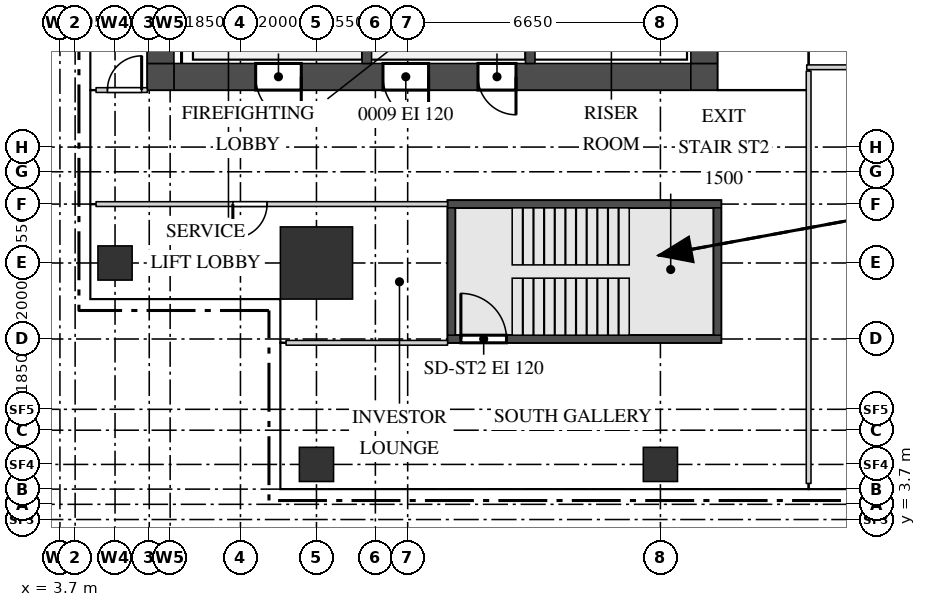
"""IFC4 building model, lengths in metres.
Left out: names, types, materials, properties, quantities, classifications, styles, units other than length and angle.
Written with IfcOpenShell. Run it as: python <this file> out.ifc"""

import sys

from ifc_helpers import new_model, si_unit, direction, frame, frame_2d, origin, origin_2d, place, context, subcontext, project, spatial, rectangle, extrude, source, transform, mapped, element, fill, save


model = new_model("IFC4")
c1 = context("Model", 3, precision=1e-05, world=origin(), true_north=direction((0.0, 1.0)))
c2 = subcontext(c1, "Body", "Model", "MODEL_VIEW")
j1 = project(units=[si_unit("LENGTHUNIT", "METRE"), si_unit("PLANEANGLEUNIT", "RADIAN")], contexts=[c1])
p1 = place(None, origin())
s1 = spatial("IfcSite", under=j1, at=p1, CompositionType="ELEMENT")
p2 = place(p1, origin())
s2 = spatial("IfcBuilding", under=s1, at=p2, CompositionType="ELEMENT")
p3 = place(p2, frame((0.0, 0.0, 234.2)))
s3 = spatial("IfcBuildingStorey", under=s2, at=p3, CompositionType="ELEMENT", Elevation=234.2)
m1 = source(origin(), c2, "Body", "SweptSolid", [
    extrude(rectangle(XDim=13.6, YDim=0.7, at=frame_2d((6.8, 0.0))), origin(), (0.0, 0.0, 1.0), 3.75),
])
p4 = place(p3, frame((6.7, 15.35, 0.0), z_axis=(0.0, 0.0, 1.0), x_axis=(1.0, 0.0, 0.0)))
e1 = element("IfcWall", 1, at=p4, inside=s3, PredefinedType="SHEAR", context=c2, shape_type="MappedRepresentation", body=[
    mapped(m1, transform((0.0, 0.0, 0.0))),
])
m2 = source(origin(), c2, "Body", "SweptSolid", [
    extrude(rectangle(XDim=1.2, YDim=2.1, at=frame_2d((0.6, 1.05))), frame((0.0, 0.36, 0.0), z_axis=(0.0, -1.0, 0.0), x_axis=(1.0, 0.0, 0.0)), (0.0, 0.0, 1.0), 0.72),
])
p5 = place(p4, frame((5.5, 0.0, 0.0)))
e2 = element("IfcOpeningElement", 2, at=p5, cuts=e1, PredefinedType="OPENING", context=c2, shape_type="MappedRepresentation", body=[
    mapped(m2, transform((0.0, 0.0, 0.0))),
])
p6 = place(p4, frame((2.15, 0.0, 0.0)))
e3 = element("IfcOpeningElement", 3, at=p6, cuts=e1, PredefinedType="OPENING", context=c2, shape_type="MappedRepresentation", body=[
    mapped(m2, transform((0.0, 0.0, 0.0))),
])
m3 = source(origin(), c2, "Body", "SweptSolid", [
    extrude(rectangle(XDim=1.0, YDim=2.1, at=frame_2d((0.5, 1.05))), frame((0.0, 0.36, 0.0), z_axis=(0.0, -1.0, 0.0), x_axis=(1.0, 0.0, 0.0)), (0.0, 0.0, 1.0), 0.72),
])
p7 = place(p4, frame((8.0, 0.0, 0.0)))
e4 = element("IfcOpeningElement", 4, at=p7, cuts=e1, PredefinedType="OPENING", context=c2, shape_type="MappedRepresentation", body=[
    mapped(m3, transform((0.0, 0.0, 0.0))),
])
m4 = source(origin(), c2, "Body", "SweptSolid", [
    extrude(rectangle(XDim=0.7, YDim=0.7, at=frame_2d((0.35, 0.0))), origin(), (0.0, 0.0, 1.0), 3.75),
])
for number, where, z_axis, x_axis in (
    (5, (20.3, 15.35, 0.0), (0.0, 0.0, 1.0), (1.0, 0.0, 0.0)),
    (6, (6.0, 15.35, 0.0), (0.0, 0.0, 1.0), (1.0, 0.0, 0.0)),
):
    element("IfcWall", number, at=place(p3, frame(where, z_axis=z_axis, x_axis=x_axis)), inside=s3, PredefinedType="SHEAR", context=c2, shape_type="MappedRepresentation", body=[
        mapped(m4, transform((0.0, 0.0, 0.0))),
    ])
m5 = source(origin(), c2, "Body", "SweptSolid", [
    extrude(rectangle(XDim=22.6, YDim=0.7, at=frame_2d((11.3, 0.0))), origin(), (0.0, 0.0, 1.0), 3.75),
])
p8 = place(p3, frame((20.65, 15.7, 0.0), z_axis=(0.0, 0.0, 1.0), x_axis=(0.0, 1.0, 0.0)))
e7 = element("IfcWall", 7, at=p8, inside=s3, PredefinedType="SHEAR", context=c2, shape_type="MappedRepresentation", body=[
    mapped(m5, transform((0.0, 0.0, 0.0))),
])
m6 = source(origin(), c2, "Body", "SweptSolid", [
    extrude(rectangle(XDim=1.8, YDim=2.1, at=frame_2d((0.9, 1.05))), frame((0.0, 0.36, 0.0), z_axis=(0.0, -1.0, 0.0), x_axis=(1.0, 0.0, 0.0)), (0.0, 0.0, 1.0), 0.72),
])
p9 = place(p8, frame((10.8, 0.0, 0.0)))
e8 = element("IfcOpeningElement", 8, at=p9, cuts=e7, PredefinedType="OPENING", context=c2, shape_type="MappedRepresentation", body=[
    mapped(m6, transform((0.0, 0.0, 0.0))),
])
m7 = source(origin(), c2, "Body", "SweptSolid", [
    extrude(rectangle(XDim=0.9, YDim=2.1, at=frame_2d((0.45, 1.05))), frame((0.0, 0.36, 0.0), z_axis=(0.0, -1.0, 0.0), x_axis=(1.0, 0.0, 0.0)), (0.0, 0.0, 1.0), 0.72),
])
p10 = place(p8, frame((0.45, 0.0, 0.0)))
e9 = element("IfcOpeningElement", 9, at=p10, cuts=e7, PredefinedType="OPENING", context=c2, shape_type="MappedRepresentation", body=[
    mapped(m7, transform((0.0, 0.0, 0.0))),
])
p11 = place(p8, frame((2.2, 0.0, 0.0)))
e10 = element("IfcOpeningElement", 10, at=p11, cuts=e7, PredefinedType="OPENING", context=c2, shape_type="MappedRepresentation", body=[
    mapped(m3, transform((0.0, 0.0, 0.0))),
])
p12 = place(p8, frame((5.0, 0.0, 0.0)))
e11 = element("IfcOpeningElement", 11, at=p12, cuts=e7, PredefinedType="OPENING", context=c2, shape_type="MappedRepresentation", body=[
    mapped(m7, transform((0.0, 0.0, 0.0))),
])
p13 = place(p3, frame((6.35, 15.7, 0.0), z_axis=(0.0, 0.0, 1.0), x_axis=(0.0, 1.0, 0.0)))
e12 = element("IfcWall", 12, at=p13, inside=s3, PredefinedType="SHEAR", context=c2, shape_type="MappedRepresentation", body=[
    mapped(m5, transform((0.0, 0.0, 0.0))),
])
m8 = source(origin(), c2, "Body", "SweptSolid", [
    extrude(rectangle(XDim=7.2, YDim=0.2, at=frame_2d((3.6, 0.0))), origin(), (0.0, 0.0, 1.0), 3.75),
])
p14 = place(p3, frame((13.9, 12.0, 0.0), z_axis=(0.0, 0.0, 1.0), x_axis=(1.0, 0.0, 0.0)))
e13 = element("IfcWall", 13, at=p14, inside=s3, PredefinedType="SHEAR", context=c2, shape_type="MappedRepresentation", body=[
    mapped(m8, transform((0.0, 0.0, 0.0))),
])
p15 = place(p3, frame((13.9, 8.45, 0.0), z_axis=(0.0, 0.0, 1.0), x_axis=(1.0, 0.0, 0.0)))
e14 = element("IfcWall", 14, at=p15, inside=s3, PredefinedType="SHEAR", context=c2, shape_type="MappedRepresentation", body=[
    mapped(m8, transform((0.0, 0.0, 0.0))),
])
m9 = source(origin(), c2, "Body", "SweptSolid", [
    extrude(rectangle(XDim=1.2, YDim=2.1, at=frame_2d((0.6, 1.05))), frame((0.0, 0.11, 0.0), z_axis=(0.0, -1.0, 0.0), x_axis=(1.0, 0.0, 0.0)), (0.0, 0.0, 1.0), 0.22),
])
p16 = place(p15, frame((0.35, 0.0, 0.0)))
e15 = element("IfcOpeningElement", 15, at=p16, cuts=e14, PredefinedType="OPENING", context=c2, shape_type="MappedRepresentation", body=[
    mapped(m9, transform((0.0, 0.0, 0.0))),
])
m10 = source(origin(), c2, "Body", "SweptSolid", [
    extrude(rectangle(XDim=3.35, YDim=0.2, at=frame_2d((1.675, 0.0))), origin(), (0.0, 0.0, 1.0), 3.75),
])
for number, where, z_axis, x_axis in (
    (16, (21.0, 8.55, 0.0), (0.0, 0.0, 1.0), (0.0, 1.0, 0.0)),
    (17, (14.0, 8.55, 0.0), (0.0, 0.0, 1.0), (0.0, 1.0, 0.0)),
):
    element("IfcWall", number, at=place(p3, frame(where, z_axis=z_axis, x_axis=x_axis)), inside=s3, PredefinedType="SHEAR", context=c2, shape_type="MappedRepresentation", body=[
        mapped(m10, transform((0.0, 0.0, 0.0))),
    ])
m11 = source(origin(), c2, "Body", "SweptSolid", [
    extrude(rectangle(XDim=3.5, YDim=0.25, at=frame_2d((1.75, 0.0))), origin(), (0.0, 0.0, 1.0), 3.75),
])
for number, where, z_axis, x_axis in (
    (18, (16.075, 15.7, 0.0), (0.0, 0.0, 1.0), (0.0, 1.0, 0.0)),
    (19, (11.775, 15.7, 0.0), (0.0, 0.0, 1.0), (0.0, 1.0, 0.0)),
):
    element("IfcWall", number, at=place(p3, frame(where, z_axis=z_axis, x_axis=x_axis)), inside=s3, PredefinedType="STANDARD", context=c2, shape_type="MappedRepresentation", body=[
        mapped(m11, transform((0.0, 0.0, 0.0))),
    ])
m12 = source(origin(), c2, "Body", "SweptSolid", [
    extrude(rectangle(XDim=1.9, YDim=1.9, at=origin_2d()), origin(), (0.0, 0.0, 1.0), 4.0),
])
p17 = place(p3, frame((10.45, 10.45, 0.0), z_axis=(0.0, 0.0, 1.0), x_axis=(1.0, 0.0, 0.0)))
e20 = element("IfcColumn", 20, at=p17, inside=s3, PredefinedType="COLUMN", context=c2, shape_type="MappedRepresentation", body=[
    mapped(m12, transform((0.0, 0.0, 0.0))),
])
m13 = source(origin(), c2, "Body", "SweptSolid", [
    extrude(rectangle(XDim=0.9, YDim=0.9, at=origin_2d()), origin(), (0.0, 0.0, 1.0), 3.75),
])
for number, where, z_axis, x_axis in (
    (21, (10.45, 5.15, 0.0), (0.0, 0.0, 1.0), (1.0, 0.0, 0.0)),
    (22, (19.5, 5.15, 0.0), (0.0, 0.0, 1.0), (1.0, 0.0, 0.0)),
    (23, (5.15, 10.45, 0.0), (0.0, 0.0, 1.0), (1.0, 0.0, 0.0)),
):
    element("IfcColumn", number, at=place(p3, frame(where, z_axis=z_axis, x_axis=x_axis)), inside=s3, PredefinedType="COLUMN", context=c2, shape_type="MappedRepresentation", body=[
        mapped(m13, transform((0.0, 0.0, 0.0))),
    ])
m14 = source(origin(), c2, "Body", "SweptSolid", [
    extrude(rectangle(XDim=10.85, YDim=0.125, at=frame_2d((5.425, 0.0))), origin(), (0.0, 0.0, 1.0), 3.8),
])
p18 = place(p3, frame((23.4, 4.65, 0.0), z_axis=(0.0, 0.0, 1.0), x_axis=(0.0, 1.0, 0.0)))
e24 = element("IfcWall", 24, at=p18, inside=s3, PredefinedType="PARTITIONING", context=c2, shape_type="MappedRepresentation", body=[
    mapped(m14, transform((0.0, 0.0, 0.0))),
])
m15 = source(origin(), c2, "Body", "SweptSolid", [
    extrude(rectangle(XDim=4.25, YDim=0.125, at=frame_2d((2.125, 0.0))), origin(), (0.0, 0.0, 1.0), 3.8),
])
p19 = place(p3, frame((9.65, 8.35, 0.0), z_axis=(0.0, 0.0, 1.0), x_axis=(1.0, 0.0, 0.0)))
e25 = element("IfcWall", 25, at=p19, inside=s3, PredefinedType="PARTITIONING", context=c2, shape_type="MappedRepresentation", body=[
    mapped(m15, transform((0.0, 0.0, 0.0))),
])
m16 = source(origin(), c2, "Body", "SweptSolid", [
    extrude(rectangle(XDim=9.25, YDim=0.125, at=frame_2d((4.625, 0.0))), origin(), (0.0, 0.0, 1.0), 3.8),
])
p20 = place(p3, frame((4.65, 12.0, 0.0), z_axis=(0.0, 0.0, 1.0), x_axis=(1.0, 0.0, 0.0)))
e26 = element("IfcWall", 26, at=p20, inside=s3, PredefinedType="PARTITIONING", context=c2, shape_type="MappedRepresentation", body=[
    mapped(m16, transform((0.0, 0.0, 0.0))),
])
m17 = source(origin(), c2, "Body", "SweptSolid", [
    extrude(rectangle(XDim=0.9, YDim=2.1, at=frame_2d((0.45, 1.05))), frame((0.0, 0.073, 0.0), z_axis=(0.0, -1.0, 0.0), x_axis=(1.0, 0.0, 0.0)), (0.0, 0.0, 1.0), 0.145),
])
p21 = place(p20, frame((3.6, 0.0, 0.0)))
e27 = element("IfcOpeningElement", 27, at=p21, cuts=e26, PredefinedType="OPENING", context=c2, shape_type="MappedRepresentation", body=[
    mapped(m17, transform((0.0, 0.0, 0.0))),
])
m18 = source(origin(), c2, "Body", "SweptSolid", [
    extrude(rectangle(XDim=1.35, YDim=0.125, at=frame_2d((0.675, 0.0))), origin(), (0.0, 0.0, 1.0), 3.8),
])
p22 = place(p3, frame((4.65, 15.0, 0.0), z_axis=(0.0, 0.0, 1.0), x_axis=(1.0, 0.0, 0.0)))
e28 = element("IfcWall", 28, at=p22, inside=s3, PredefinedType="PARTITIONING", context=c2, shape_type="MappedRepresentation", body=[
    mapped(m18, transform((0.0, 0.0, 0.0))),
])
p23 = place(p22, frame((0.3, 0.0, 0.0)))
e29 = element("IfcOpeningElement", 29, at=p23, cuts=e28, PredefinedType="OPENING", context=c2, shape_type="MappedRepresentation", body=[
    mapped(m17, transform((0.0, 0.0, 0.0))),
])
m19 = source(origin(), c2, "Body", "SweptSolid", [
    extrude(rectangle(XDim=26.0, YDim=0.125, at=frame_2d((13.0, 0.0))), origin(), (0.0, 0.0, 1.0), 3.8),
])
p24 = place(p3, frame((23.35, 15.6, 0.0), z_axis=(0.0, 0.0, 1.0), x_axis=(1.0, 0.0, 0.0)))
e30 = element("IfcWall", 30, at=p24, inside=s3, PredefinedType="PARTITIONING", context=c2, shape_type="MappedRepresentation", body=[
    mapped(m19, transform((0.0, 0.0, 0.0))),
])
m20 = source(origin(), c2, "Body", "SweptSolid", [
    extrude(rectangle(XDim=1.2, YDim=2.1, at=frame_2d((0.6, 1.05))), frame((0.0, 0.073, 0.0), z_axis=(0.0, -1.0, 0.0), x_axis=(1.0, 0.0, 0.0)), (0.0, 0.0, 1.0), 0.145),
])
p25 = place(p24, frame((5.0, 0.0, 0.0)))
e31 = element("IfcOpeningElement", 31, at=p25, cuts=e30, PredefinedType="OPENING", context=c2, shape_type="MappedRepresentation", body=[
    mapped(m20, transform((0.0, 0.0, 0.0))),
])
p26 = place(p24, frame((15.1, 0.0, 0.0)))
e32 = element("IfcOpeningElement", 32, at=p26, cuts=e30, PredefinedType="OPENING", context=c2, shape_type="MappedRepresentation", body=[
    mapped(m17, transform((0.0, 0.0, 0.0))),
])
p27 = place(p24, frame((22.6, 0.0, 0.0)))
e33 = element("IfcOpeningElement", 33, at=p27, cuts=e30, PredefinedType="OPENING", context=c2, shape_type="MappedRepresentation", body=[
    mapped(m17, transform((0.0, 0.0, 0.0))),
])
m21 = source(origin(), c2, "Body", "SweptSolid", [
    extrude(rectangle(XDim=1.2, YDim=2.1, at=frame_2d((0.6, 1.05))), frame((0.0, 0.3, 0.0), z_axis=(0.0, -1.0, 0.0), x_axis=(1.0, 0.0, 0.0)), (0.0, 0.0, 1.0), 0.6),
])
p28 = place(p5, origin())
e34 = element("IfcDoor", 34, at=p28, inside=s3, OperationType="SINGLE_SWING_RIGHT", PredefinedType="DOOR", context=c2, shape_type="MappedRepresentation", body=[
    mapped(m21, transform((0.0, 0.0, 0.0))),
])
fill(e2, e34)
p29 = place(p6, origin())
e35 = element("IfcDoor", 35, at=p29, inside=s3, OperationType="SINGLE_SWING_RIGHT", PredefinedType="DOOR", context=c2, shape_type="MappedRepresentation", body=[
    mapped(m21, transform((0.0, 0.0, 0.0))),
])
fill(e3, e35)
m22 = source(origin(), c2, "Body", "SweptSolid", [
    extrude(rectangle(XDim=1.0, YDim=2.1, at=frame_2d((0.5, 1.05))), frame((0.0, 0.3, 0.0), z_axis=(0.0, -1.0, 0.0), x_axis=(1.0, 0.0, 0.0)), (0.0, 0.0, 1.0), 0.6),
])
p30 = place(p7, origin())
e36 = element("IfcDoor", 36, at=p30, inside=s3, OperationType="SINGLE_SWING_RIGHT", PredefinedType="DOOR", context=c2, shape_type="MappedRepresentation", body=[
    mapped(m22, transform((0.0, 0.0, 0.0))),
])
fill(e4, e36)
m23 = source(origin(), c2, "Body", "SweptSolid", [
    extrude(rectangle(XDim=0.9, YDim=2.1, at=frame_2d((0.45, 1.05))), frame((0.0, 0.025, 0.0), z_axis=(0.0, -1.0, 0.0), x_axis=(1.0, 0.0, 0.0)), (0.0, 0.0, 1.0), 0.05),
])
p31 = place(p23, origin())
e37 = element("IfcDoor", 37, at=p31, inside=s3, OperationType="SINGLE_SWING_LEFT", PredefinedType="DOOR", context=c2, shape_type="MappedRepresentation", body=[
    mapped(m23, transform((0.0, 0.0, 0.0))),
])
fill(e29, e37)
p32 = place(p21, origin())
e38 = element("IfcDoor", 38, at=p32, inside=s3, OperationType="SINGLE_SWING_LEFT", PredefinedType="DOOR", context=c2, shape_type="MappedRepresentation", body=[
    mapped(m23, transform((0.0, 0.0, 0.0))),
])
fill(e27, e38)
m24 = source(origin(), c2, "Body", "SweptSolid", [
    extrude(rectangle(XDim=1.2, YDim=2.1, at=frame_2d((0.6, 1.05))), frame((0.0, 0.025, 0.0), z_axis=(0.0, -1.0, 0.0), x_axis=(1.0, 0.0, 0.0)), (0.0, 0.0, 1.0), 0.05),
])
p33 = place(p16, origin())
e39 = element("IfcDoor", 39, at=p33, inside=s3, OperationType="SINGLE_SWING_RIGHT", PredefinedType="DOOR", context=c2, shape_type="MappedRepresentation", body=[
    mapped(m24, transform((0.0, 0.0, 0.0))),
])
fill(e15, e39)
save(model, sys.argv[1])
